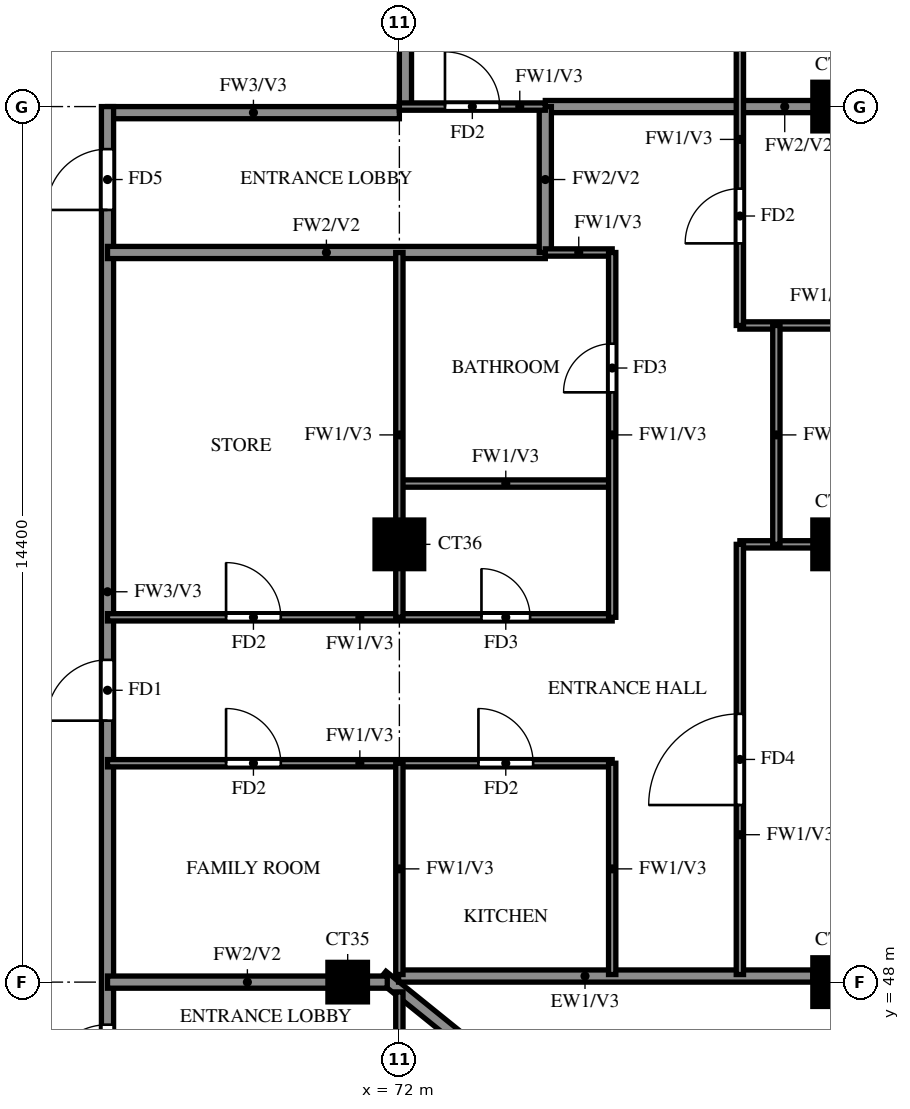
"""IFC4 building model, lengths in metres.
Left out: names, types, materials, properties, quantities, classifications, styles, units other than length and angle.
Written with IfcOpenShell. Run it as: python <this file> out.ifc"""

import sys

from ifc_helpers import new_model, si_unit, direction, frame, frame_2d, origin, origin_2d, place, context, subcontext, project, spatial, rectangle, extrude, source, transform, mapped, element, fill, save


model = new_model("IFC4")
c1 = context("Model", 3, precision=1e-05, world=origin(), true_north=direction((0.0, 1.0)))
c2 = subcontext(c1, "Body", "Model", "MODEL_VIEW")
j1 = project(units=[si_unit("LENGTHUNIT", "METRE"), si_unit("PLANEANGLEUNIT", "RADIAN")], contexts=[c1])
p1 = place(None, origin())
s1 = spatial("IfcSite", under=j1, at=p1, CompositionType="ELEMENT")
p2 = place(p1, origin())
s2 = spatial("IfcBuilding", under=s1, at=p2, CompositionType="ELEMENT")
p3 = place(p2, frame((0.0, 0.0, 239.5)))
s3 = spatial("IfcBuildingStorey", under=s2, at=p3, CompositionType="ELEMENT", Elevation=239.5)
m1 = source(origin(), c2, "Body", "SweptSolid", [
    extrude(rectangle(XDim=0.65, YDim=0.65, at=origin_2d()), origin(), (0.0, 0.0, 1.0), 3.22),
])
p4 = place(p3, frame((71.15, 48.0, 0.0), z_axis=(0.0, 0.0, 1.0), x_axis=(1.0, 0.0, 0.0)))
e1 = element("IfcColumn", 1, at=p4, inside=s3, PredefinedType="COLUMN", context=c2, shape_type="MappedRepresentation", body=[
    mapped(m1, transform((0.0, 0.0, 0.0))),
])
m2 = source(origin(), c2, "Body", "SweptSolid", [
    extrude(rectangle(XDim=0.8, YDim=0.8, at=origin_2d()), origin(), (0.0, 0.0, 1.0), 3.22),
])
for number, where, z_axis, x_axis in (
    (2, (79.2, 48.0, 0.0), (0.0, 0.0, 1.0), (1.0, 0.0, 0.0)),
    (3, (72.0, 55.2, 0.0), (0.0, 0.0, 1.0), (1.0, 0.0, 0.0)),
    (4, (79.2, 55.2, 0.0), (0.0, 0.0, 1.0), (1.0, 0.0, 0.0)),
    (5, (79.2, 62.4, 0.0), (0.0, 0.0, 1.0), (1.0, 0.0, 0.0)),
):
    element("IfcColumn", number, at=place(p3, frame(where, z_axis=z_axis, x_axis=x_axis)), inside=s3, PredefinedType="COLUMN", context=c2, shape_type="MappedRepresentation", body=[
        mapped(m2, transform((0.0, 0.0, 0.0))),
    ])
p5 = place(p3, frame((81.907, 39.87, 0.0), z_axis=(0.0, 0.0, 1.0), x_axis=(-0.777936274417, 0.62834318087, 0.0)))
e6 = element("IfcWall", 6, at=p5, inside=s3, PredefinedType="SOLIDWALL", context=c2, shape_type="SweptSolid", body=[
    extrude(rectangle(XDim=13.099, YDim=0.2, at=frame_2d((6.549, 0.0))), origin(), (0.0, 0.0, 1.0), 3.22),
])
p6 = place(p5, frame((9.938, 0.0, 1.5)))
e7 = element("IfcOpeningElement", 7, at=p6, cuts=e6, PredefinedType="OPENING", context=c2, shape_type="SweptSolid", body=[
    extrude(rectangle(XDim=0.9, YDim=0.9, at=frame_2d((0.45, 0.45))), frame((0.0, 0.11, 0.0), z_axis=(0.0, -1.0, 0.0), x_axis=(1.0, 0.0, 0.0)), (0.0, 0.0, 1.0), 0.22),
])
p7 = place(p3, frame((71.987, 48.1, 0.0), z_axis=(0.0, 0.0, 1.0), x_axis=(1.0, 0.0, 0.0)))
e8 = element("IfcWall", 8, at=p7, inside=s3, PredefinedType="SOLIDWALL", context=c2, shape_type="SweptSolid", body=[
    extrude(rectangle(XDim=6.813, YDim=0.2, at=frame_2d((3.406, 0.0))), origin(), (0.0, 0.0, 1.0), 3.22),
])
p8 = place(p3, frame((67.2, 62.3, 0.0), z_axis=(0.0, 0.0, 1.0), x_axis=(1.0, 0.0, 0.0)))
e9 = element("IfcWall", 9, at=p8, inside=s3, PredefinedType="SOLIDWALL", context=c2, shape_type="SweptSolid", body=[
    extrude(rectangle(XDim=4.8, YDim=0.2, at=frame_2d((2.4, 0.0))), origin(), (0.0, 0.0, 1.0), 3.22),
])
p9 = place(p3, frame((67.2, 45.6, 0.0), z_axis=(0.0, 0.0, 1.0), x_axis=(0.0, 1.0, 0.0)))
e10 = element("IfcWall", 10, at=p9, inside=s3, PredefinedType="SOLIDWALL", context=c2, shape_type="SweptSolid", body=[
    extrude(rectangle(XDim=16.8, YDim=0.2, at=frame_2d((8.4, 0.0))), origin(), (0.0, 0.0, 1.0), 3.22),
])
p10 = place(p9, frame((6.7, 0.0, 0.0)))
e11 = element("IfcOpeningElement", 11, at=p10, cuts=e10, PredefinedType="OPENING", context=c2, shape_type="SweptSolid", body=[
    extrude(rectangle(XDim=1.0, YDim=2.1, at=frame_2d((0.5, 1.05))), frame((0.0, 0.11, 0.0), z_axis=(0.0, -1.0, 0.0), x_axis=(1.0, 0.0, 0.0)), (0.0, 0.0, 1.0), 0.22),
])
p11 = place(p9, frame((15.1, 0.0, 0.0)))
e12 = element("IfcOpeningElement", 12, at=p11, cuts=e10, PredefinedType="OPENING", context=c2, shape_type="SweptSolid", body=[
    extrude(rectangle(XDim=1.0, YDim=2.1, at=frame_2d((0.5, 1.05))), frame((0.0, 0.11, 0.0), z_axis=(0.0, -1.0, 0.0), x_axis=(1.0, 0.0, 0.0)), (0.0, 0.0, 1.0), 0.22),
])
p12 = place(p9, frame((0.7, 0.0, 0.0)))
e13 = element("IfcOpeningElement", 13, at=p12, cuts=e10, PredefinedType="OPENING", context=c2, shape_type="SweptSolid", body=[
    extrude(rectangle(XDim=1.0, YDim=2.1, at=frame_2d((0.5, 1.05))), frame((0.0, 0.11, 0.0), z_axis=(0.0, -1.0, 0.0), x_axis=(1.0, 0.0, 0.0)), (0.0, 0.0, 1.0), 0.22),
])
p13 = place(p3, frame((72.1, 62.4, 0.0), z_axis=(0.0, 0.0, 1.0), x_axis=(0.0, 1.0, 0.0)))
e14 = element("IfcWall", 14, at=p13, inside=s3, PredefinedType="SOLIDWALL", context=c2, shape_type="SweptSolid", body=[
    extrude(rectangle(XDim=15.6, YDim=0.2, at=frame_2d((7.8, 0.0))), origin(), (0.0, 0.0, 1.0), 3.22),
])
p14 = place(p3, frame((67.2, 48.0, 0.0), z_axis=(0.0, 0.0, 1.0), x_axis=(1.0, 0.0, 0.0)))
e15 = element("IfcWall", 15, at=p14, inside=s3, PredefinedType="SOLIDWALL", context=c2, shape_type="SweptSolid", body=[
    extrude(rectangle(XDim=4.601, YDim=0.2, at=frame_2d((2.301, 0.0))), origin(), (0.0, 0.0, 1.0), 3.22),
])
p15 = place(p3, frame((67.2, 60.0, 0.0), z_axis=(0.0, 0.0, 1.0), x_axis=(1.0, 0.0, 0.0)))
e16 = element("IfcWall", 16, at=p15, inside=s3, PredefinedType="SOLIDWALL", context=c2, shape_type="SweptSolid", body=[
    extrude(rectangle(XDim=7.2, YDim=0.2, at=frame_2d((3.6, 0.0))), origin(), (0.0, 0.0, 1.0), 3.22),
])
p16 = place(p3, frame((74.4, 62.4, 0.0), z_axis=(0.0, 0.0, 1.0), x_axis=(1.0, 0.0, 0.0)))
e17 = element("IfcWall", 17, at=p16, inside=s3, PredefinedType="SOLIDWALL", context=c2, shape_type="SweptSolid", body=[
    extrude(rectangle(XDim=7.875, YDim=0.2, at=frame_2d((3.938, 0.0))), origin(), (0.0, 0.0, 1.0), 3.22),
])
p17 = place(p3, frame((74.4, 60.0, 0.0), z_axis=(0.0, 0.0, 1.0), x_axis=(0.0, 1.0, 0.0)))
e18 = element("IfcWall", 18, at=p17, inside=s3, PredefinedType="SOLIDWALL", context=c2, shape_type="SweptSolid", body=[
    extrude(rectangle(XDim=2.4, YDim=0.2, at=frame_2d((1.2, 0.0))), origin(), (0.0, 0.0, 1.0), 3.22),
])
p18 = place(p3, frame((67.2, 51.6, 0.0), z_axis=(0.0, 0.0, 1.0), x_axis=(1.0, 0.0, 0.0)))
e19 = element("IfcWall", 19, at=p18, inside=s3, PredefinedType="PARTITIONING", context=c2, shape_type="SweptSolid", body=[
    extrude(rectangle(XDim=8.3, YDim=0.12, at=frame_2d((4.15, 0.0))), origin(), (0.0, 0.0, 1.0), 3.22),
])
p19 = place(p18, frame((6.1, 0.0, 0.0)))
e20 = element("IfcOpeningElement", 20, at=p19, cuts=e19, PredefinedType="OPENING", context=c2, shape_type="SweptSolid", body=[
    extrude(rectangle(XDim=0.9, YDim=2.1, at=frame_2d((0.45, 1.05))), frame((0.0, 0.07, 0.0), z_axis=(0.0, -1.0, 0.0), x_axis=(1.0, 0.0, 0.0)), (0.0, 0.0, 1.0), 0.14),
])
p20 = place(p18, frame((1.95, 0.0, 0.0)))
e21 = element("IfcOpeningElement", 21, at=p20, cuts=e19, PredefinedType="OPENING", context=c2, shape_type="SweptSolid", body=[
    extrude(rectangle(XDim=0.9, YDim=2.1, at=frame_2d((0.45, 1.05))), frame((0.0, 0.07, 0.0), z_axis=(0.0, -1.0, 0.0), x_axis=(1.0, 0.0, 0.0)), (0.0, 0.0, 1.0), 0.14),
])
p21 = place(p3, frame((67.2, 54.0, 0.0), z_axis=(0.0, 0.0, 1.0), x_axis=(1.0, 0.0, 0.0)))
e22 = element("IfcWall", 22, at=p21, inside=s3, PredefinedType="PARTITIONING", context=c2, shape_type="SweptSolid", body=[
    extrude(rectangle(XDim=8.3, YDim=0.12, at=frame_2d((4.15, 0.0))), origin(), (0.0, 0.0, 1.0), 3.22),
])
p22 = place(p21, frame((6.15, 0.0, 0.0)))
e23 = element("IfcOpeningElement", 23, at=p22, cuts=e22, PredefinedType="OPENING", context=c2, shape_type="SweptSolid", body=[
    extrude(rectangle(XDim=0.8, YDim=2.1, at=frame_2d((0.4, 1.05))), frame((0.0, 0.07, 0.0), z_axis=(0.0, -1.0, 0.0), x_axis=(1.0, 0.0, 0.0)), (0.0, 0.0, 1.0), 0.14),
])
p23 = place(p21, frame((1.95, 0.0, 0.0)))
e24 = element("IfcOpeningElement", 24, at=p23, cuts=e22, PredefinedType="OPENING", context=c2, shape_type="SweptSolid", body=[
    extrude(rectangle(XDim=0.9, YDim=2.1, at=frame_2d((0.45, 1.05))), frame((0.0, 0.07, 0.0), z_axis=(0.0, -1.0, 0.0), x_axis=(1.0, 0.0, 0.0)), (0.0, 0.0, 1.0), 0.14),
])
p24 = place(p3, frame((77.6, 55.2, 0.0), z_axis=(0.0, 0.0, 1.0), x_axis=(1.0, 0.0, 0.0)))
e25 = element("IfcWall", 25, at=p24, inside=s3, PredefinedType="PARTITIONING", context=c2, shape_type="SweptSolid", body=[
    extrude(rectangle(XDim=4.675, YDim=0.12, at=frame_2d((2.337, 0.0))), origin(), (0.0, 0.0, 1.0), 3.22),
])
p25 = place(p3, frame((72.0, 56.2, 0.0), z_axis=(0.0, 0.0, 1.0), x_axis=(1.0, 0.0, 0.0)))
e26 = element("IfcWall", 26, at=p25, inside=s3, PredefinedType="PARTITIONING", context=c2, shape_type="SweptSolid", body=[
    extrude(rectangle(XDim=3.5, YDim=0.12, at=frame_2d((1.75, 0.0))), origin(), (0.0, 0.0, 1.0), 3.22),
])
p26 = place(p3, frame((77.6, 58.8, 0.0), z_axis=(0.0, 0.0, 1.0), x_axis=(1.0, 0.0, 0.0)))
e27 = element("IfcWall", 27, at=p26, inside=s3, PredefinedType="PARTITIONING", context=c2, shape_type="SweptSolid", body=[
    extrude(rectangle(XDim=4.675, YDim=0.12, at=frame_2d((2.337, 0.0))), origin(), (0.0, 0.0, 1.0), 2.32),
])
p27 = place(p26, frame((2.238, 0.0, 0.0)))
e28 = element("IfcOpeningElement", 28, at=p27, cuts=e27, PredefinedType="OPENING", context=c2, shape_type="SweptSolid", body=[
    extrude(rectangle(XDim=0.8, YDim=2.1, at=frame_2d((0.4, 1.05))), frame((0.0, 0.07, 0.0), z_axis=(0.0, -1.0, 0.0), x_axis=(1.0, 0.0, 0.0)), (0.0, 0.0, 1.0), 0.14),
])
p28 = place(p3, frame((74.4, 60.0, 0.0), z_axis=(0.0, 0.0, 1.0), x_axis=(1.0, 0.0, 0.0)))
e29 = element("IfcWall", 29, at=p28, inside=s3, PredefinedType="PARTITIONING", context=c2, shape_type="SweptSolid", body=[
    extrude(rectangle(XDim=1.1, YDim=0.12, at=frame_2d((0.55, 0.0))), origin(), (0.0, 0.0, 1.0), 3.22),
])
p29 = place(p3, frame((72.0, 62.4, 0.0), z_axis=(0.0, 0.0, 1.0), x_axis=(1.0, 0.0, 0.0)))
e30 = element("IfcWall", 30, at=p29, inside=s3, PredefinedType="PARTITIONING", context=c2, shape_type="SweptSolid", body=[
    extrude(rectangle(XDim=2.4, YDim=0.12, at=frame_2d((1.2, 0.0))), origin(), (0.0, 0.0, 1.0), 3.22),
])
p30 = place(p29, frame((0.75, 0.0, 0.0)))
e31 = element("IfcOpeningElement", 31, at=p30, cuts=e30, PredefinedType="OPENING", context=c2, shape_type="SweptSolid", body=[
    extrude(rectangle(XDim=0.9, YDim=2.1, at=frame_2d((0.45, 1.05))), frame((0.0, 0.07, 0.0), z_axis=(0.0, -1.0, 0.0), x_axis=(1.0, 0.0, 0.0)), (0.0, 0.0, 1.0), 0.14),
])
p31 = place(p3, frame((72.0, 39.725, 0.0), z_axis=(0.0, 0.0, 1.0), x_axis=(0.0, 1.0, 0.0)))
e32 = element("IfcWall", 32, at=p31, inside=s3, PredefinedType="PARTITIONING", context=c2, shape_type="SweptSolid", body=[
    extrude(rectangle(XDim=8.114, YDim=0.12, at=frame_2d((4.057, 0.0))), origin(), (0.0, 0.0, 1.0), 2.32),
])
p32 = place(p31, frame((1.788, 0.0, 0.0)))
e33 = element("IfcOpeningElement", 33, at=p32, cuts=e32, PredefinedType="OPENING", context=c2, shape_type="SweptSolid", body=[
    extrude(rectangle(XDim=1.5, YDim=2.1, at=frame_2d((0.75, 1.05))), frame((0.0, 0.07, 0.0), z_axis=(0.0, -1.0, 0.0), x_axis=(1.0, 0.0, 0.0)), (0.0, 0.0, 1.0), 0.14),
])
p33 = place(p31, frame((4.575, 0.0, 0.0)))
e34 = element("IfcOpeningElement", 34, at=p33, cuts=e32, PredefinedType="OPENING", context=c2, shape_type="SweptSolid", body=[
    extrude(rectangle(XDim=0.8, YDim=2.1, at=frame_2d((0.4, 1.05))), frame((0.0, 0.07, 0.0), z_axis=(0.0, -1.0, 0.0), x_axis=(1.0, 0.0, 0.0)), (0.0, 0.0, 1.0), 0.14),
])
p34 = place(p3, frame((72.0, 48.125, 0.0), z_axis=(0.0, 0.0, 1.0), x_axis=(0.0, 1.0, 0.0)))
e35 = element("IfcWall", 35, at=p34, inside=s3, PredefinedType="PARTITIONING", context=c2, shape_type="SweptSolid", body=[
    extrude(rectangle(XDim=3.475, YDim=0.12, at=frame_2d((1.738, 0.0))), origin(), (0.0, 0.0, 1.0), 3.22),
])
p35 = place(p3, frame((72.0, 54.0, 0.0), z_axis=(0.0, 0.0, 1.0), x_axis=(0.0, 1.0, 0.0)))
e36 = element("IfcWall", 36, at=p35, inside=s3, PredefinedType="PARTITIONING", context=c2, shape_type="SweptSolid", body=[
    extrude(rectangle(XDim=6.0, YDim=0.12, at=frame_2d((3.0, 0.0))), origin(), (0.0, 0.0, 1.0), 3.22),
])
p36 = place(p3, frame((75.5, 48.125, 0.0), z_axis=(0.0, 0.0, 1.0), x_axis=(0.0, 1.0, 0.0)))
e37 = element("IfcWall", 37, at=p36, inside=s3, PredefinedType="PARTITIONING", context=c2, shape_type="SweptSolid", body=[
    extrude(rectangle(XDim=3.475, YDim=0.12, at=frame_2d((1.738, 0.0))), origin(), (0.0, 0.0, 1.0), 3.22),
])
p37 = place(p3, frame((75.5, 54.0, 0.0), z_axis=(0.0, 0.0, 1.0), x_axis=(0.0, 1.0, 0.0)))
e38 = element("IfcWall", 38, at=p37, inside=s3, PredefinedType="PARTITIONING", context=c2, shape_type="SweptSolid", body=[
    extrude(rectangle(XDim=6.0, YDim=0.12, at=frame_2d((3.0, 0.0))), origin(), (0.0, 0.0, 1.0), 3.22),
])
p38 = place(p37, frame((3.7, 0.0, 0.0)))
e39 = element("IfcOpeningElement", 39, at=p38, cuts=e38, PredefinedType="OPENING", context=c2, shape_type="SweptSolid", body=[
    extrude(rectangle(XDim=0.8, YDim=2.1, at=frame_2d((0.4, 1.05))), frame((0.0, 0.07, 0.0), z_axis=(0.0, -1.0, 0.0), x_axis=(1.0, 0.0, 0.0)), (0.0, 0.0, 1.0), 0.14),
])
p39 = place(p3, frame((77.6, 48.125, 0.0), z_axis=(0.0, 0.0, 1.0), x_axis=(0.0, 1.0, 0.0)))
e40 = element("IfcWall", 40, at=p39, inside=s3, PredefinedType="PARTITIONING", context=c2, shape_type="SweptSolid", body=[
    extrude(rectangle(XDim=7.075, YDim=0.12, at=frame_2d((3.538, 0.0))), origin(), (0.0, 0.0, 1.0), 3.22),
])
p40 = place(p39, frame((2.788, 0.0, 0.0)))
e41 = element("IfcOpeningElement", 41, at=p40, cuts=e40, PredefinedType="OPENING", context=c2, shape_type="SweptSolid", body=[
    extrude(rectangle(XDim=1.5, YDim=2.1, at=frame_2d((0.75, 1.05))), frame((0.0, 0.07, 0.0), z_axis=(0.0, -1.0, 0.0), x_axis=(1.0, 0.0, 0.0)), (0.0, 0.0, 1.0), 0.14),
])
p41 = place(p3, frame((77.6, 58.8, 0.0), z_axis=(0.0, 0.0, 1.0), x_axis=(0.0, 1.0, 0.0)))
e42 = element("IfcWall", 42, at=p41, inside=s3, PredefinedType="PARTITIONING", context=c2, shape_type="SweptSolid", body=[
    extrude(rectangle(XDim=7.2, YDim=0.12, at=frame_2d((3.6, 0.0))), origin(), (0.0, 0.0, 1.0), 3.22),
])
p42 = place(p41, frame((1.35, 0.0, 0.0)))
e43 = element("IfcOpeningElement", 43, at=p42, cuts=e42, PredefinedType="OPENING", context=c2, shape_type="SweptSolid", body=[
    extrude(rectangle(XDim=0.9, YDim=2.1, at=frame_2d((0.45, 1.05))), frame((0.0, 0.07, 0.0), z_axis=(0.0, -1.0, 0.0), x_axis=(1.0, 0.0, 0.0)), (0.0, 0.0, 1.0), 0.14),
])
p43 = place(p41, frame((4.95, 0.0, 0.0)))
e44 = element("IfcOpeningElement", 44, at=p43, cuts=e42, PredefinedType="OPENING", context=c2, shape_type="SweptSolid", body=[
    extrude(rectangle(XDim=0.9, YDim=2.1, at=frame_2d((0.45, 1.05))), frame((0.0, 0.07, 0.0), z_axis=(0.0, -1.0, 0.0), x_axis=(1.0, 0.0, 0.0)), (0.0, 0.0, 1.0), 0.14),
])
p44 = place(p3, frame((78.2, 55.2, 0.0), z_axis=(0.0, 0.0, 1.0), x_axis=(0.0, 1.0, 0.0)))
e45 = element("IfcWall", 45, at=p44, inside=s3, PredefinedType="PARTITIONING", context=c2, shape_type="SweptSolid", body=[
    extrude(rectangle(XDim=3.6, YDim=0.12, at=frame_2d((1.8, 0.0))), origin(), (0.0, 0.0, 1.0), 3.22),
])
p45 = place(p10, origin())
e46 = element("IfcDoor", 46, at=p45, inside=s3, OperationType="SINGLE_SWING_LEFT", PredefinedType="DOOR", context=c2, shape_type="SweptSolid", body=[
    extrude(rectangle(XDim=1.0, YDim=2.1, at=frame_2d((0.5, 1.05))), frame((0.0, 0.025, 0.0), z_axis=(0.0, -1.0, 0.0), x_axis=(1.0, 0.0, 0.0)), (0.0, 0.0, 1.0), 0.05),
])
fill(e11, e46)
p46 = place(p40, origin())
e47 = element("IfcDoor", 47, at=p46, inside=s3, OperationType="SINGLE_SWING_RIGHT", PredefinedType="DOOR", context=c2, shape_type="SweptSolid", body=[
    extrude(rectangle(XDim=1.5, YDim=2.1, at=frame_2d((0.75, 1.05))), frame((0.0, 0.025, 0.0), z_axis=(0.0, -1.0, 0.0), x_axis=(1.0, 0.0, 0.0)), (0.0, 0.0, 1.0), 0.05),
])
fill(e41, e47)
p47 = place(p42, origin())
e48 = element("IfcDoor", 48, at=p47, inside=s3, OperationType="SINGLE_SWING_LEFT", PredefinedType="DOOR", context=c2, shape_type="SweptSolid", body=[
    extrude(rectangle(XDim=0.9, YDim=2.1, at=frame_2d((0.45, 1.05))), frame((0.0, 0.025, 0.0), z_axis=(0.0, -1.0, 0.0), x_axis=(1.0, 0.0, 0.0)), (0.0, 0.0, 1.0), 0.05),
])
fill(e43, e48)
p48 = place(p19, origin())
e49 = element("IfcDoor", 49, at=p48, inside=s3, OperationType="SINGLE_SWING_RIGHT", PredefinedType="DOOR", context=c2, shape_type="SweptSolid", body=[
    extrude(rectangle(XDim=0.9, YDim=2.1, at=frame_2d((0.45, 1.05))), frame((0.0, 0.025, 0.0), z_axis=(0.0, -1.0, 0.0), x_axis=(1.0, 0.0, 0.0)), (0.0, 0.0, 1.0), 0.05),
])
fill(e20, e49)
p49 = place(p22, origin())
e50 = element("IfcDoor", 50, at=p49, inside=s3, OperationType="SINGLE_SWING_LEFT", PredefinedType="DOOR", context=c2, shape_type="SweptSolid", body=[
    extrude(rectangle(XDim=0.8, YDim=2.1, at=frame_2d((0.4, 1.05))), frame((0.0, 0.025, 0.0), z_axis=(0.0, -1.0, 0.0), x_axis=(1.0, 0.0, 0.0)), (0.0, 0.0, 1.0), 0.05),
])
fill(e23, e50)
p50 = place(p38, origin())
e51 = element("IfcDoor", 51, at=p50, inside=s3, OperationType="SINGLE_SWING_LEFT", PredefinedType="DOOR", context=c2, shape_type="SweptSolid", body=[
    extrude(rectangle(XDim=0.8, YDim=2.1, at=frame_2d((0.4, 1.05))), frame((0.0, 0.025, 0.0), z_axis=(0.0, -1.0, 0.0), x_axis=(1.0, 0.0, 0.0)), (0.0, 0.0, 1.0), 0.05),
])
fill(e39, e51)
p51 = place(p20, origin())
e52 = element("IfcDoor", 52, at=p51, inside=s3, OperationType="SINGLE_SWING_RIGHT", PredefinedType="DOOR", context=c2, shape_type="SweptSolid", body=[
    extrude(rectangle(XDim=0.9, YDim=2.1, at=frame_2d((0.45, 1.05))), frame((0.0, 0.025, 0.0), z_axis=(0.0, -1.0, 0.0), x_axis=(1.0, 0.0, 0.0)), (0.0, 0.0, 1.0), 0.05),
])
fill(e21, e52)
p52 = place(p23, origin())
e53 = element("IfcDoor", 53, at=p52, inside=s3, OperationType="SINGLE_SWING_LEFT", PredefinedType="DOOR", context=c2, shape_type="SweptSolid", body=[
    extrude(rectangle(XDim=0.9, YDim=2.1, at=frame_2d((0.45, 1.05))), frame((0.0, 0.025, 0.0), z_axis=(0.0, -1.0, 0.0), x_axis=(1.0, 0.0, 0.0)), (0.0, 0.0, 1.0), 0.05),
])
fill(e24, e53)
p53 = place(p30, origin())
e54 = element("IfcDoor", 54, at=p53, inside=s3, OperationType="SINGLE_SWING_RIGHT", PredefinedType="DOOR", context=c2, shape_type="SweptSolid", body=[
    extrude(rectangle(XDim=0.9, YDim=2.1, at=frame_2d((0.45, 1.05))), frame((0.0, 0.025, 0.0), z_axis=(0.0, -1.0, 0.0), x_axis=(1.0, 0.0, 0.0)), (0.0, 0.0, 1.0), 0.05),
])
fill(e31, e54)
p54 = place(p11, origin())
e55 = element("IfcDoor", 55, at=p54, inside=s3, OperationType="SINGLE_SWING_LEFT", PredefinedType="DOOR", context=c2, shape_type="SweptSolid", body=[
    extrude(rectangle(XDim=1.0, YDim=2.1, at=frame_2d((0.5, 1.05))), frame((0.0, 0.025, 0.0), z_axis=(0.0, -1.0, 0.0), x_axis=(1.0, 0.0, 0.0)), (0.0, 0.0, 1.0), 0.05),
])
fill(e12, e55)
p55 = place(p12, origin())
e56 = element("IfcDoor", 56, at=p55, inside=s3, OperationType="SINGLE_SWING_LEFT", PredefinedType="DOOR", context=c2, shape_type="SweptSolid", body=[
    extrude(rectangle(XDim=1.0, YDim=2.1, at=frame_2d((0.5, 1.05))), frame((0.0, 0.025, 0.0), z_axis=(0.0, -1.0, 0.0), x_axis=(1.0, 0.0, 0.0)), (0.0, 0.0, 1.0), 0.05),
])
fill(e13, e56)
save(model, sys.argv[1])
